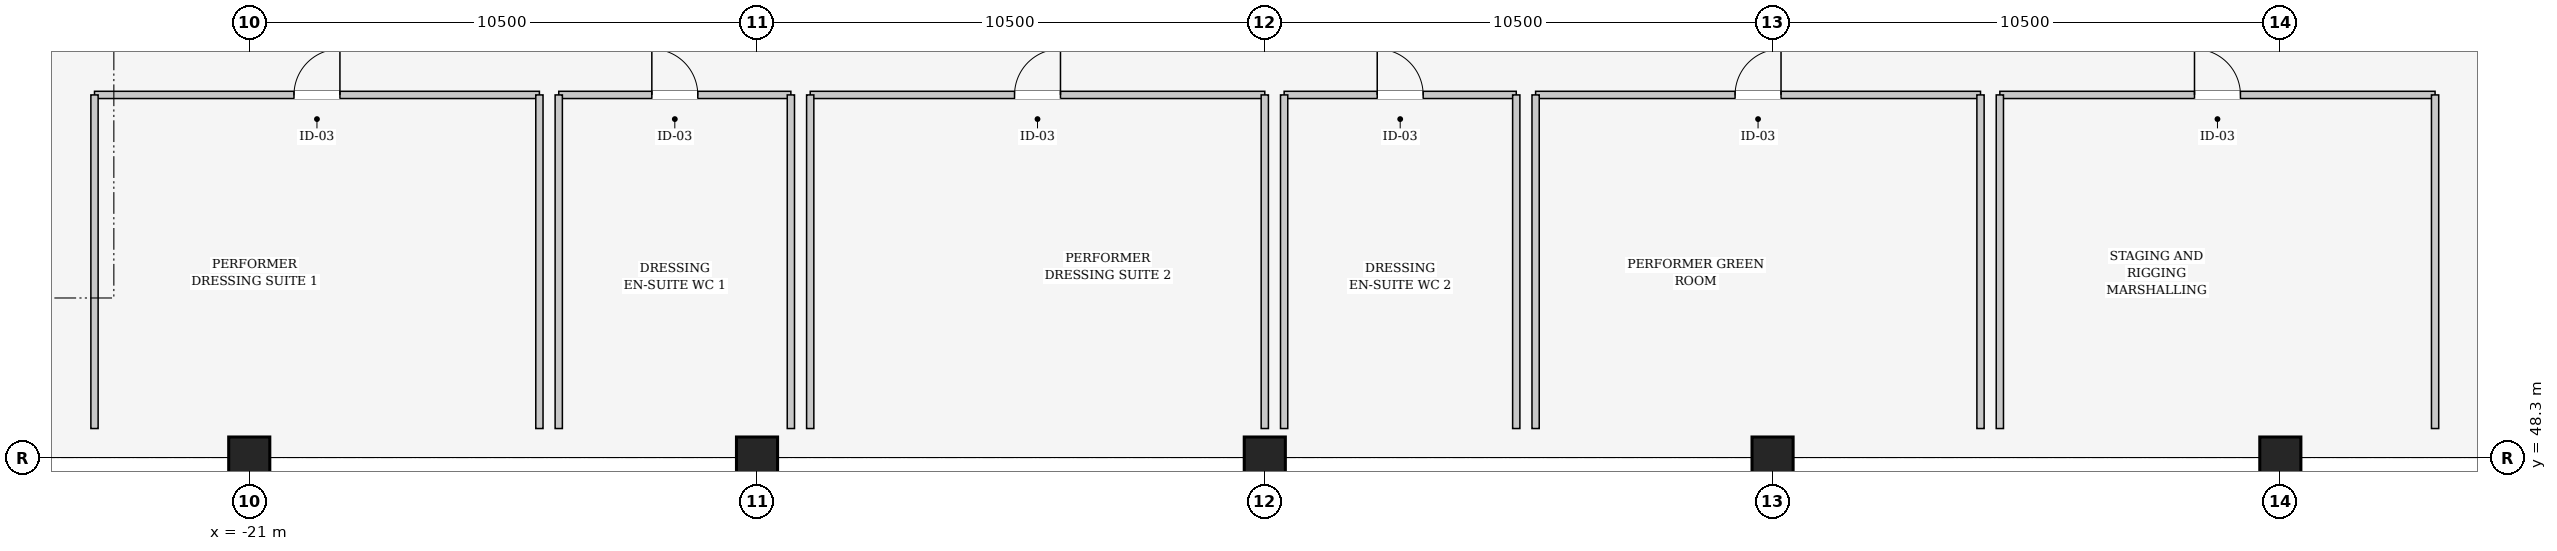
"""IFC4 building model, lengths in metres.
Left out: names, types, materials, properties, quantities, classifications, styles, units other than length and angle.
Written with IfcOpenShell. Run it as: python <this file> out.ifc"""

import sys

from ifc_helpers import new_model, si_unit, direction, frame, frame_2d, origin, origin_2d, place, context, subcontext, project, spatial, rectangle, extrude, element, fill, save


model = new_model("IFC4")
c1 = context("Model", 3, precision=1e-05, world=origin(), true_north=direction((0.0, 1.0)))
c2 = subcontext(c1, "Body", "Model", "MODEL_VIEW")
j1 = project(units=[si_unit("LENGTHUNIT", "METRE"), si_unit("PLANEANGLEUNIT", "RADIAN")], contexts=[c1])
p1 = place(None, origin())
s1 = spatial("IfcSite", under=j1, at=p1, CompositionType="ELEMENT")
p2 = place(p1, origin())
s2 = spatial("IfcBuilding", under=s1, at=p2, CompositionType="ELEMENT")
p3 = place(p2, origin())
s3 = spatial("IfcBuildingStorey", under=s2, at=p3, CompositionType="ELEMENT", Elevation=0.0)
for number, where, z_axis, x_axis in (
    (1, (-21.0, 48.3, 0.0), (0.0, 0.0, 1.0), (1.0, 0.0, 0.0)),
    (2, (-10.5, 48.3, 0.0), (0.0, 0.0, 1.0), (1.0, 0.0, 0.0)),
    (3, (0.0, 48.3, 0.0), (0.0, 0.0, 1.0), (1.0, 0.0, 0.0)),
    (4, (10.5, 48.3, 0.0), (0.0, 0.0, 1.0), (1.0, 0.0, 0.0)),
    (5, (21.0, 48.3, 0.0), (0.0, 0.0, 1.0), (1.0, 0.0, 0.0)),
):
    element("IfcColumn", number, at=place(p3, frame(where, z_axis=z_axis, x_axis=x_axis)), inside=s3, PredefinedType="COLUMN", context=c2, shape_type="SweptSolid", body=[
        extrude(rectangle(XDim=0.85, YDim=0.85, at=origin_2d()), origin(), (0.0, 0.0, 1.0), 6.0),
    ])
p4 = place(p3, frame((-24.2, 55.8, 0.0), z_axis=(0.0, 0.0, 1.0), x_axis=(1.0, 0.0, 0.0)))
e6 = element("IfcWall", 6, at=p4, inside=s3, PredefinedType="PARTITIONING", context=c2, shape_type="SweptSolid", body=[
    extrude(rectangle(XDim=9.2, YDim=0.15, at=frame_2d((4.6, 0.0))), origin(), (0.0, 0.0, 1.0), 5.142),
])
p5 = place(p4, frame((4.125, 0.0, 0.0)))
e7 = element("IfcOpeningElement", 7, at=p5, cuts=e6, PredefinedType="OPENING", context=c2, shape_type="SweptSolid", body=[
    extrude(rectangle(XDim=0.95, YDim=2.15, at=frame_2d((0.475, 1.075))), frame((0.0, 0.085, 0.0), z_axis=(0.0, -1.0, 0.0), x_axis=(1.0, 0.0, 0.0)), (0.0, 0.0, 1.0), 0.17),
])
p6 = place(p3, frame((-15.0, 55.8, 0.0), z_axis=(0.0, 0.0, 1.0), x_axis=(0.0, -1.0, 0.0)))
e8 = element("IfcWall", 8, at=p6, inside=s3, PredefinedType="PARTITIONING", context=c2, shape_type="SweptSolid", body=[
    extrude(rectangle(XDim=6.9, YDim=0.15, at=frame_2d((3.45, 0.0))), origin(), (0.0, 0.0, 1.0), 5.32),
])
p7 = place(p3, frame((-24.2, 48.9, 0.0), z_axis=(0.0, 0.0, 1.0), x_axis=(0.0, 1.0, 0.0)))
e9 = element("IfcWall", 9, at=p7, inside=s3, PredefinedType="PARTITIONING", context=c2, shape_type="SweptSolid", body=[
    extrude(rectangle(XDim=6.9, YDim=0.15, at=frame_2d((3.45, 0.0))), origin(), (0.0, 0.0, 1.0), 5.64),
])
p8 = place(p3, frame((-14.6, 55.8, 0.0), z_axis=(0.0, 0.0, 1.0), x_axis=(1.0, 0.0, 0.0)))
e10 = element("IfcWall", 10, at=p8, inside=s3, PredefinedType="PARTITIONING", context=c2, shape_type="SweptSolid", body=[
    extrude(rectangle(XDim=4.8, YDim=0.15, at=frame_2d((2.4, 0.0))), origin(), (0.0, 0.0, 1.0), 5.142),
])
p9 = place(p8, frame((1.925, 0.0, 0.0)))
e11 = element("IfcOpeningElement", 11, at=p9, cuts=e10, PredefinedType="OPENING", context=c2, shape_type="SweptSolid", body=[
    extrude(rectangle(XDim=0.95, YDim=2.15, at=frame_2d((0.475, 1.075))), frame((0.0, 0.085, 0.0), z_axis=(0.0, -1.0, 0.0), x_axis=(1.0, 0.0, 0.0)), (0.0, 0.0, 1.0), 0.17),
])
for number, where, z_axis, x_axis in (
    (12, (-9.8, 55.8, 0.0), (0.0, 0.0, 1.0), (0.0, -1.0, 0.0)),
    (13, (-14.6, 48.9, 0.0), (0.0, 0.0, 1.0), (0.0, 1.0, 0.0)),
):
    element("IfcWall", number, at=place(p3, frame(where, z_axis=z_axis, x_axis=x_axis)), inside=s3, PredefinedType="PARTITIONING", context=c2, shape_type="SweptSolid", body=[
        extrude(rectangle(XDim=6.9, YDim=0.15, at=frame_2d((3.45, 0.0))), origin(), (0.0, 0.0, 1.0), 5.32),
    ])
p10 = place(p3, frame((-9.4, 55.8, 0.0), z_axis=(0.0, 0.0, 1.0), x_axis=(1.0, 0.0, 0.0)))
e14 = element("IfcWall", 14, at=p10, inside=s3, PredefinedType="PARTITIONING", context=c2, shape_type="SweptSolid", body=[
    extrude(rectangle(XDim=9.4, YDim=0.15, at=frame_2d((4.7, 0.0))), origin(), (0.0, 0.0, 1.0), 5.142),
])
p11 = place(p10, frame((4.225, 0.0, 0.0)))
e15 = element("IfcOpeningElement", 15, at=p11, cuts=e14, PredefinedType="OPENING", context=c2, shape_type="SweptSolid", body=[
    extrude(rectangle(XDim=0.95, YDim=2.15, at=frame_2d((0.475, 1.075))), frame((0.0, 0.085, 0.0), z_axis=(0.0, -1.0, 0.0), x_axis=(1.0, 0.0, 0.0)), (0.0, 0.0, 1.0), 0.17),
])
p12 = place(p3, frame((0.0, 55.8, 0.0), z_axis=(0.0, 0.0, 1.0), x_axis=(0.0, -1.0, 0.0)))
e16 = element("IfcWall", 16, at=p12, inside=s3, PredefinedType="PARTITIONING", context=c2, shape_type="SweptSolid", body=[
    extrude(rectangle(XDim=6.9, YDim=0.15, at=frame_2d((3.45, 0.0))), origin(), (0.0, 0.0, 1.0), 5.142),
])
p13 = place(p3, frame((-9.4, 48.9, 0.0), z_axis=(0.0, 0.0, 1.0), x_axis=(0.0, 1.0, 0.0)))
e17 = element("IfcWall", 17, at=p13, inside=s3, PredefinedType="PARTITIONING", context=c2, shape_type="SweptSolid", body=[
    extrude(rectangle(XDim=6.9, YDim=0.15, at=frame_2d((3.45, 0.0))), origin(), (0.0, 0.0, 1.0), 5.32),
])
p14 = place(p3, frame((0.4, 55.8, 0.0), z_axis=(0.0, 0.0, 1.0), x_axis=(1.0, 0.0, 0.0)))
e18 = element("IfcWall", 18, at=p14, inside=s3, PredefinedType="PARTITIONING", context=c2, shape_type="SweptSolid", body=[
    extrude(rectangle(XDim=4.8, YDim=0.15, at=frame_2d((2.4, 0.0))), origin(), (0.0, 0.0, 1.0), 5.64),
])
p15 = place(p14, frame((1.925, 0.0, 0.0)))
e19 = element("IfcOpeningElement", 19, at=p15, cuts=e18, PredefinedType="OPENING", context=c2, shape_type="SweptSolid", body=[
    extrude(rectangle(XDim=0.95, YDim=2.15, at=frame_2d((0.475, 1.075))), frame((0.0, 0.085, 0.0), z_axis=(0.0, -1.0, 0.0), x_axis=(1.0, 0.0, 0.0)), (0.0, 0.0, 1.0), 0.17),
])
for number, where, z_axis, x_axis in (
    (20, (5.2, 55.8, 0.0), (0.0, 0.0, 1.0), (0.0, -1.0, 0.0)),
    (21, (0.4, 48.9, 0.0), (0.0, 0.0, 1.0), (0.0, 1.0, 0.0)),
):
    element("IfcWall", number, at=place(p3, frame(where, z_axis=z_axis, x_axis=x_axis)), inside=s3, PredefinedType="PARTITIONING", context=c2, shape_type="SweptSolid", body=[
        extrude(rectangle(XDim=6.9, YDim=0.15, at=frame_2d((3.45, 0.0))), origin(), (0.0, 0.0, 1.0), 5.32),
    ])
p16 = place(p3, frame((5.6, 55.8, 0.0), z_axis=(0.0, 0.0, 1.0), x_axis=(1.0, 0.0, 0.0)))
e22 = element("IfcWall", 22, at=p16, inside=s3, PredefinedType="PARTITIONING", context=c2, shape_type="SweptSolid", body=[
    extrude(rectangle(XDim=9.2, YDim=0.15, at=frame_2d((4.6, 0.0))), origin(), (0.0, 0.0, 1.0), 5.142),
])
p17 = place(p16, frame((4.125, 0.0, 0.0)))
e23 = element("IfcOpeningElement", 23, at=p17, cuts=e22, PredefinedType="OPENING", context=c2, shape_type="SweptSolid", body=[
    extrude(rectangle(XDim=0.95, YDim=2.15, at=frame_2d((0.475, 1.075))), frame((0.0, 0.085, 0.0), z_axis=(0.0, -1.0, 0.0), x_axis=(1.0, 0.0, 0.0)), (0.0, 0.0, 1.0), 0.17),
])
for number, where, z_axis, x_axis in (
    (24, (14.8, 55.8, 0.0), (0.0, 0.0, 1.0), (0.0, -1.0, 0.0)),
    (25, (5.6, 48.9, 0.0), (0.0, 0.0, 1.0), (0.0, 1.0, 0.0)),
):
    element("IfcWall", number, at=place(p3, frame(where, z_axis=z_axis, x_axis=x_axis)), inside=s3, PredefinedType="PARTITIONING", context=c2, shape_type="SweptSolid", body=[
        extrude(rectangle(XDim=6.9, YDim=0.15, at=frame_2d((3.45, 0.0))), origin(), (0.0, 0.0, 1.0), 5.32),
    ])
p18 = place(p3, frame((15.2, 55.8, 0.0), z_axis=(0.0, 0.0, 1.0), x_axis=(1.0, 0.0, 0.0)))
e26 = element("IfcWall", 26, at=p18, inside=s3, PredefinedType="PARTITIONING", context=c2, shape_type="SweptSolid", body=[
    extrude(rectangle(XDim=9.0, YDim=0.15, at=frame_2d((4.5, 0.0))), origin(), (0.0, 0.0, 1.0), 5.142),
])
p19 = place(p18, frame((4.025, 0.0, 0.0)))
e27 = element("IfcOpeningElement", 27, at=p19, cuts=e26, PredefinedType="OPENING", context=c2, shape_type="SweptSolid", body=[
    extrude(rectangle(XDim=0.95, YDim=2.15, at=frame_2d((0.475, 1.075))), frame((0.0, 0.085, 0.0), z_axis=(0.0, -1.0, 0.0), x_axis=(1.0, 0.0, 0.0)), (0.0, 0.0, 1.0), 0.17),
])
p20 = place(p3, frame((24.2, 55.8, 0.0), z_axis=(0.0, 0.0, 1.0), x_axis=(0.0, -1.0, 0.0)))
e28 = element("IfcWall", 28, at=p20, inside=s3, PredefinedType="PARTITIONING", context=c2, shape_type="SweptSolid", body=[
    extrude(rectangle(XDim=6.9, YDim=0.15, at=frame_2d((3.45, 0.0))), origin(), (0.0, 0.0, 1.0), 5.64),
])
p21 = place(p3, frame((15.2, 48.9, 0.0), z_axis=(0.0, 0.0, 1.0), x_axis=(0.0, 1.0, 0.0)))
e29 = element("IfcWall", 29, at=p21, inside=s3, PredefinedType="PARTITIONING", context=c2, shape_type="SweptSolid", body=[
    extrude(rectangle(XDim=6.9, YDim=0.15, at=frame_2d((3.45, 0.0))), origin(), (0.0, 0.0, 1.0), 5.32),
])
p22 = place(p5, origin())
e30 = element("IfcDoor", 30, at=p22, inside=s3, OperationType="SINGLE_SWING_RIGHT", PredefinedType="DOOR", context=c2, shape_type="SweptSolid", body=[
    extrude(rectangle(XDim=0.95, YDim=2.15, at=frame_2d((0.475, 1.075))), frame((0.0, 0.025, 0.0), z_axis=(0.0, -1.0, 0.0), x_axis=(1.0, 0.0, 0.0)), (0.0, 0.0, 1.0), 0.05),
])
fill(e7, e30)
p23 = place(p9, origin())
e31 = element("IfcDoor", 31, at=p23, inside=s3, OperationType="SINGLE_SWING_LEFT", PredefinedType="DOOR", context=c2, shape_type="SweptSolid", body=[
    extrude(rectangle(XDim=0.95, YDim=2.15, at=frame_2d((0.475, 1.075))), frame((0.0, 0.025, 0.0), z_axis=(0.0, -1.0, 0.0), x_axis=(1.0, 0.0, 0.0)), (0.0, 0.0, 1.0), 0.05),
])
fill(e11, e31)
p24 = place(p11, origin())
e32 = element("IfcDoor", 32, at=p24, inside=s3, OperationType="SINGLE_SWING_RIGHT", PredefinedType="DOOR", context=c2, shape_type="SweptSolid", body=[
    extrude(rectangle(XDim=0.95, YDim=2.15, at=frame_2d((0.475, 1.075))), frame((0.0, 0.025, 0.0), z_axis=(0.0, -1.0, 0.0), x_axis=(1.0, 0.0, 0.0)), (0.0, 0.0, 1.0), 0.05),
])
fill(e15, e32)
p25 = place(p15, origin())
e33 = element("IfcDoor", 33, at=p25, inside=s3, OperationType="SINGLE_SWING_LEFT", PredefinedType="DOOR", context=c2, shape_type="SweptSolid", body=[
    extrude(rectangle(XDim=0.95, YDim=2.15, at=frame_2d((0.475, 1.075))), frame((0.0, 0.025, 0.0), z_axis=(0.0, -1.0, 0.0), x_axis=(1.0, 0.0, 0.0)), (0.0, 0.0, 1.0), 0.05),
])
fill(e19, e33)
p26 = place(p17, origin())
e34 = element("IfcDoor", 34, at=p26, inside=s3, OperationType="SINGLE_SWING_RIGHT", PredefinedType="DOOR", context=c2, shape_type="SweptSolid", body=[
    extrude(rectangle(XDim=0.95, YDim=2.15, at=frame_2d((0.475, 1.075))), frame((0.0, 0.025, 0.0), z_axis=(0.0, -1.0, 0.0), x_axis=(1.0, 0.0, 0.0)), (0.0, 0.0, 1.0), 0.05),
])
fill(e23, e34)
p27 = place(p19, origin())
e35 = element("IfcDoor", 35, at=p27, inside=s3, OperationType="SINGLE_SWING_LEFT", PredefinedType="DOOR", context=c2, shape_type="SweptSolid", body=[
    extrude(rectangle(XDim=0.95, YDim=2.15, at=frame_2d((0.475, 1.075))), frame((0.0, 0.025, 0.0), z_axis=(0.0, -1.0, 0.0), x_axis=(1.0, 0.0, 0.0)), (0.0, 0.0, 1.0), 0.05),
])
fill(e27, e35)
save(model, sys.argv[1])
